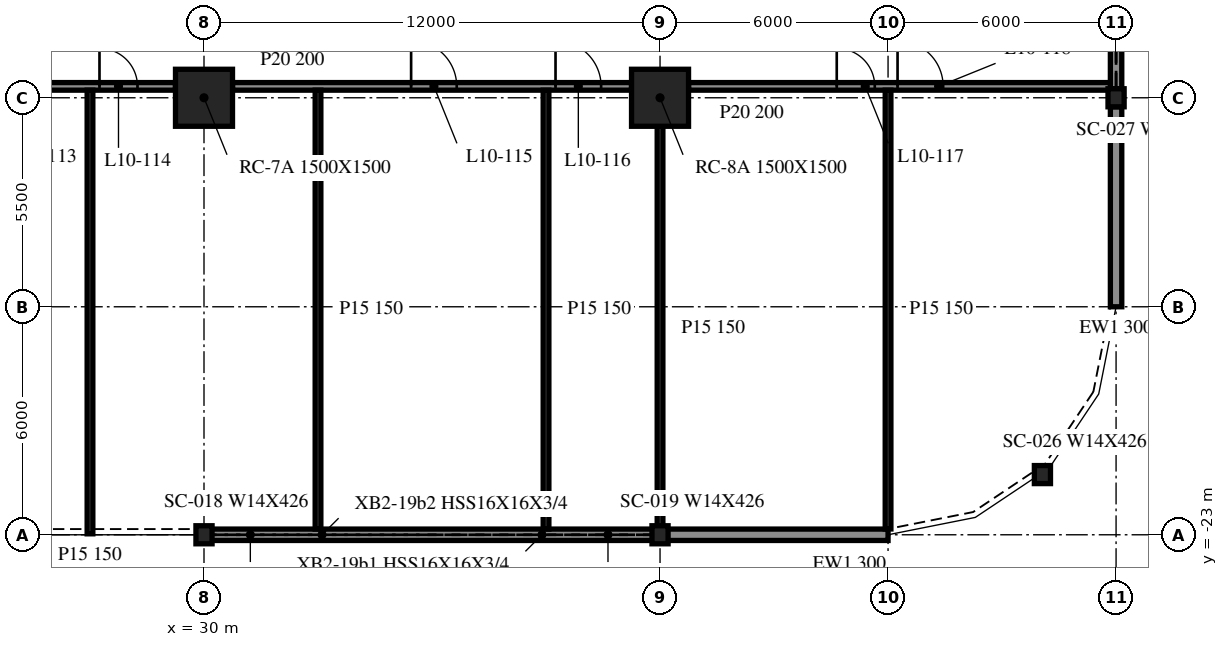
"""IFC4 building model, lengths in metres.
Left out: names, types, materials, properties, quantities, classifications, styles, units other than length and angle.
Written with IfcOpenShell. Run it as: python <this file> out.ifc"""

import sys

from ifc_helpers import new_model, si_unit, direction, frame, frame_2d, origin, origin_2d, place, context, subcontext, project, spatial, rectangle, i_section, extrude, element, fill, save


model = new_model("IFC4")
c1 = context("Model", 3, precision=1e-05, world=origin(), true_north=direction((0.0, 1.0)))
c2 = subcontext(c1, "Body", "Model", "MODEL_VIEW")
j1 = project(units=[si_unit("LENGTHUNIT", "METRE"), si_unit("PLANEANGLEUNIT", "RADIAN")], contexts=[c1])
p1 = place(None, origin())
s1 = spatial("IfcSite", under=j1, at=p1, CompositionType="ELEMENT")
p2 = place(p1, origin())
s2 = spatial("IfcBuilding", under=s1, at=p2, CompositionType="ELEMENT")
p3 = place(p2, frame((0.0, 0.0, 46.0)))
s3 = spatial("IfcBuildingStorey", under=s2, at=p3, CompositionType="ELEMENT", Elevation=46.0)
for number, where, z_axis, x_axis in (
    (1, (30.0, -11.5, -0.34), (0.0, 0.0, 1.0), (1.0, 0.0, 0.0)),
    (2, (42.0, -11.5, -0.34), (0.0, 0.0, 1.0), (1.0, 0.0, 0.0)),
):
    element("IfcColumn", number, at=place(p3, frame(where, z_axis=z_axis, x_axis=x_axis)), inside=s3, PredefinedType="COLUMN", context=c2, shape_type="SweptSolid", body=[
        extrude(rectangle(XDim=1.5, YDim=1.5, at=origin_2d()), origin(), (0.0, 0.0, 1.0), 4.3),
    ])
for number, where, z_axis, x_axis in (
    (3, (30.0, -23.0, -0.34), (0.0, 0.0, 1.0), (1.0, 0.0, 0.0)),
    (4, (42.0, -23.0, -0.34), (0.0, 0.0, 1.0), (1.0, 0.0, 0.0)),
    (5, (52.062, -21.416, -0.34), (0.0, 0.0, 1.0), (1.0, 0.0, 0.0)),
    (6, (54.0, -11.5, -0.34), (0.0, 0.0, 1.0), (1.0, 0.0, 0.0)),
):
    element("IfcColumn", number, at=place(p3, frame(where, z_axis=z_axis, x_axis=x_axis)), inside=s3, PredefinedType="COLUMN", context=c2, shape_type="SweptSolid", body=[
        extrude(i_section(OverallWidth=0.424, OverallDepth=0.475, WebThickness=0.048, FlangeThickness=0.077, at=origin_2d()), origin(), (0.0, 0.0, 1.0), 4.3),
    ])
p4 = place(p3, frame((30.024, -23.0, 0.0), z_axis=(0.0, 0.0, 1.0), x_axis=(1.0, 0.0, 0.0)))
e7 = element("IfcWall", 7, at=p4, inside=s3, PredefinedType="NOTDEFINED", context=c2, shape_type="SweptSolid", body=[
    extrude(rectangle(XDim=11.952, YDim=0.3, at=frame_2d((5.976, 0.0))), origin(), (0.0, 0.0, 1.0), 3.203),
])
p5 = place(p3, frame((42.024, -23.0, 0.0), z_axis=(0.0, 0.0, 1.0), x_axis=(1.0, 0.0, 0.0)))
e8 = element("IfcWall", 8, at=p5, inside=s3, PredefinedType="NOTDEFINED", context=c2, shape_type="SweptSolid", body=[
    extrude(rectangle(XDim=5.976, YDim=0.3, at=frame_2d((2.988, 0.0))), origin(), (0.0, 0.0, 1.0), 3.203),
])
p6 = place(p3, frame((54.0, -17.0, 0.0), z_axis=(0.0, 0.0, 1.0), x_axis=(0.0, 1.0, 0.0)))
e9 = element("IfcWall", 9, at=p6, inside=s3, PredefinedType="NOTDEFINED", context=c2, shape_type="SweptSolid", body=[
    extrude(rectangle(XDim=5.262, YDim=0.3, at=frame_2d((2.631, 0.0))), origin(), (0.0, 0.0, 1.0), 3.203),
])
p7 = place(p3, frame((54.0, -11.262, 0.0), z_axis=(0.0, 0.0, 1.0), x_axis=(0.0, 1.0, 0.0)))
e10 = element("IfcWall", 10, at=p7, inside=s3, PredefinedType="NOTDEFINED", context=c2, shape_type="SweptSolid", body=[
    extrude(rectangle(XDim=11.024, YDim=0.3, at=frame_2d((5.512, 0.0))), origin(), (0.0, 0.0, 1.0), 3.203),
])
p8 = place(p3, frame((18.75, -11.2, 0.0), z_axis=(0.0, 0.0, 1.0), x_axis=(1.0, 0.0, 0.0)))
e11 = element("IfcWall", 11, at=p8, inside=s3, PredefinedType="PARTITIONING", context=c2, shape_type="SweptSolid", body=[
    extrude(rectangle(XDim=10.5, YDim=0.2, at=frame_2d((5.25, 0.0))), origin(), (0.0, 0.0, 1.0), 3.96),
])
p9 = place(p8, frame((0.7, 0.0, 0.0)))
e12 = element("IfcOpeningElement", 12, at=p9, cuts=e11, PredefinedType="OPENING", context=c2, shape_type="SweptSolid", body=[
    extrude(rectangle(XDim=1.2, YDim=2.1, at=frame_2d((0.6, 1.05))), frame((0.0, 0.11, 0.0), z_axis=(0.0, -1.0, 0.0), x_axis=(1.0, 0.0, 0.0)), (0.0, 0.0, 1.0), 0.22),
])
p10 = place(p8, frame((4.7, 0.0, 0.0)))
e13 = element("IfcOpeningElement", 13, at=p10, cuts=e11, PredefinedType="OPENING", context=c2, shape_type="SweptSolid", body=[
    extrude(rectangle(XDim=1.2, YDim=2.1, at=frame_2d((0.6, 1.05))), frame((0.0, 0.11, 0.0), z_axis=(0.0, -1.0, 0.0), x_axis=(1.0, 0.0, 0.0)), (0.0, 0.0, 1.0), 0.22),
])
p11 = place(p8, frame((8.5, 0.0, 0.0)))
e14 = element("IfcOpeningElement", 14, at=p11, cuts=e11, PredefinedType="OPENING", context=c2, shape_type="SweptSolid", body=[
    extrude(rectangle(XDim=1.0, YDim=2.1, at=frame_2d((0.5, 1.05))), frame((0.0, 0.11, 0.0), z_axis=(0.0, -1.0, 0.0), x_axis=(1.0, 0.0, 0.0)), (0.0, 0.0, 1.0), 0.22),
])
p12 = place(p3, frame((30.75, -11.2, 0.0), z_axis=(0.0, 0.0, 1.0), x_axis=(1.0, 0.0, 0.0)))
e15 = element("IfcWall", 15, at=p12, inside=s3, PredefinedType="PARTITIONING", context=c2, shape_type="SweptSolid", body=[
    extrude(rectangle(XDim=10.5, YDim=0.2, at=frame_2d((5.25, 0.0))), origin(), (0.0, 0.0, 1.0), 3.96),
])
p13 = place(p12, frame((4.7, 0.0, 0.0)))
e16 = element("IfcOpeningElement", 16, at=p13, cuts=e15, PredefinedType="OPENING", context=c2, shape_type="SweptSolid", body=[
    extrude(rectangle(XDim=1.2, YDim=2.1, at=frame_2d((0.6, 1.05))), frame((0.0, 0.11, 0.0), z_axis=(0.0, -1.0, 0.0), x_axis=(1.0, 0.0, 0.0)), (0.0, 0.0, 1.0), 0.22),
])
p14 = place(p12, frame((8.5, 0.0, 0.0)))
e17 = element("IfcOpeningElement", 17, at=p14, cuts=e15, PredefinedType="OPENING", context=c2, shape_type="SweptSolid", body=[
    extrude(rectangle(XDim=1.2, YDim=2.1, at=frame_2d((0.6, 1.05))), frame((0.0, 0.11, 0.0), z_axis=(0.0, -1.0, 0.0), x_axis=(1.0, 0.0, 0.0)), (0.0, 0.0, 1.0), 0.22),
])
p15 = place(p3, frame((42.75, -11.2, 0.0), z_axis=(0.0, 0.0, 1.0), x_axis=(1.0, 0.0, 0.0)))
e18 = element("IfcWall", 18, at=p15, inside=s3, PredefinedType="PARTITIONING", context=c2, shape_type="SweptSolid", body=[
    extrude(rectangle(XDim=11.1, YDim=0.2, at=frame_2d((5.55, 0.0))), origin(), (0.0, 0.0, 1.0), 3.96),
])
p16 = place(p15, frame((3.9, 0.0, 0.0)))
e19 = element("IfcOpeningElement", 19, at=p16, cuts=e18, PredefinedType="OPENING", context=c2, shape_type="SweptSolid", body=[
    extrude(rectangle(XDim=1.0, YDim=2.1, at=frame_2d((0.5, 1.05))), frame((0.0, 0.11, 0.0), z_axis=(0.0, -1.0, 0.0), x_axis=(1.0, 0.0, 0.0)), (0.0, 0.0, 1.0), 0.22),
])
p17 = place(p15, frame((5.5, 0.0, 0.0)))
e20 = element("IfcOpeningElement", 20, at=p17, cuts=e18, PredefinedType="OPENING", context=c2, shape_type="SweptSolid", body=[
    extrude(rectangle(XDim=1.2, YDim=2.1, at=frame_2d((0.6, 1.05))), frame((0.0, 0.11, 0.0), z_axis=(0.0, -1.0, 0.0), x_axis=(1.0, 0.0, 0.0)), (0.0, 0.0, 1.0), 0.22),
])
p18 = place(p3, frame((27.0, -22.975, 0.0), z_axis=(0.0, 0.0, 1.0), x_axis=(0.0, 1.0, 0.0)))
e21 = element("IfcWall", 21, at=p18, inside=s3, PredefinedType="PARTITIONING", context=c2, shape_type="SweptSolid", body=[
    extrude(rectangle(XDim=11.675, YDim=0.15, at=frame_2d((5.837, 0.0))), origin(), (0.0, 0.0, 1.0), 3.96),
])
for number, where, z_axis, x_axis in (
    (22, (33.0, -22.85, 0.0), (0.0, 0.0, 1.0), (0.0, 1.0, 0.0)),
    (23, (39.0, -22.85, 0.0), (0.0, 0.0, 1.0), (0.0, 1.0, 0.0)),
):
    element("IfcWall", number, at=place(p3, frame(where, z_axis=z_axis, x_axis=x_axis)), inside=s3, PredefinedType="PARTITIONING", context=c2, shape_type="SweptSolid", body=[
        extrude(rectangle(XDim=11.55, YDim=0.15, at=frame_2d((5.775, 0.0))), origin(), (0.0, 0.0, 1.0), 3.96),
    ])
p19 = place(p3, frame((42.0, -22.85, 0.0), z_axis=(0.0, 0.0, 1.0), x_axis=(0.0, 1.0, 0.0)))
e24 = element("IfcWall", 24, at=p19, inside=s3, PredefinedType="PARTITIONING", context=c2, shape_type="SweptSolid", body=[
    extrude(rectangle(XDim=10.6, YDim=0.15, at=frame_2d((5.3, 0.0))), origin(), (0.0, 0.0, 1.0), 3.96),
])
p20 = place(p3, frame((48.0, -22.847, 0.0), z_axis=(0.0, 0.0, 1.0), x_axis=(0.0, 1.0, 0.0)))
e25 = element("IfcWall", 25, at=p20, inside=s3, PredefinedType="PARTITIONING", context=c2, shape_type="SweptSolid", body=[
    extrude(rectangle(XDim=11.547, YDim=0.15, at=frame_2d((5.773, 0.0))), origin(), (0.0, 0.0, 1.0), 3.96),
])
p21 = place(p11, origin())
e26 = element("IfcDoor", 26, at=p21, inside=s3, OperationType="SINGLE_SWING_LEFT", PredefinedType="DOOR", context=c2, shape_type="SweptSolid", body=[
    extrude(rectangle(XDim=1.0, YDim=2.1, at=frame_2d((0.5, 1.05))), frame((0.0, 0.025, 0.0), z_axis=(0.0, -1.0, 0.0), x_axis=(1.0, 0.0, 0.0)), (0.0, 0.0, 1.0), 0.05),
])
fill(e14, e26)
p22 = place(p13, origin())
e27 = element("IfcDoor", 27, at=p22, inside=s3, OperationType="SINGLE_SWING_LEFT", PredefinedType="DOOR", context=c2, shape_type="SweptSolid", body=[
    extrude(rectangle(XDim=1.2, YDim=2.1, at=frame_2d((0.6, 1.05))), frame((0.0, 0.025, 0.0), z_axis=(0.0, -1.0, 0.0), x_axis=(1.0, 0.0, 0.0)), (0.0, 0.0, 1.0), 0.05),
])
fill(e16, e27)
p23 = place(p14, origin())
e28 = element("IfcDoor", 28, at=p23, inside=s3, OperationType="SINGLE_SWING_LEFT", PredefinedType="DOOR", context=c2, shape_type="SweptSolid", body=[
    extrude(rectangle(XDim=1.2, YDim=2.1, at=frame_2d((0.6, 1.05))), frame((0.0, 0.025, 0.0), z_axis=(0.0, -1.0, 0.0), x_axis=(1.0, 0.0, 0.0)), (0.0, 0.0, 1.0), 0.05),
])
fill(e17, e28)
p24 = place(p16, origin())
e29 = element("IfcDoor", 29, at=p24, inside=s3, OperationType="SINGLE_SWING_RIGHT", PredefinedType="DOOR", context=c2, shape_type="SweptSolid", body=[
    extrude(rectangle(XDim=1.0, YDim=2.1, at=frame_2d((0.5, 1.05))), frame((0.0, 0.025, 0.0), z_axis=(0.0, -1.0, 0.0), x_axis=(1.0, 0.0, 0.0)), (0.0, 0.0, 1.0), 0.05),
])
fill(e19, e29)
p25 = place(p17, origin())
e30 = element("IfcDoor", 30, at=p25, inside=s3, OperationType="SINGLE_SWING_LEFT", PredefinedType="DOOR", context=c2, shape_type="SweptSolid", body=[
    extrude(rectangle(XDim=1.2, YDim=2.1, at=frame_2d((0.6, 1.05))), frame((0.0, 0.025, 0.0), z_axis=(0.0, -1.0, 0.0), x_axis=(1.0, 0.0, 0.0)), (0.0, 0.0, 1.0), 0.05),
])
fill(e20, e30)
save(model, sys.argv[1])
